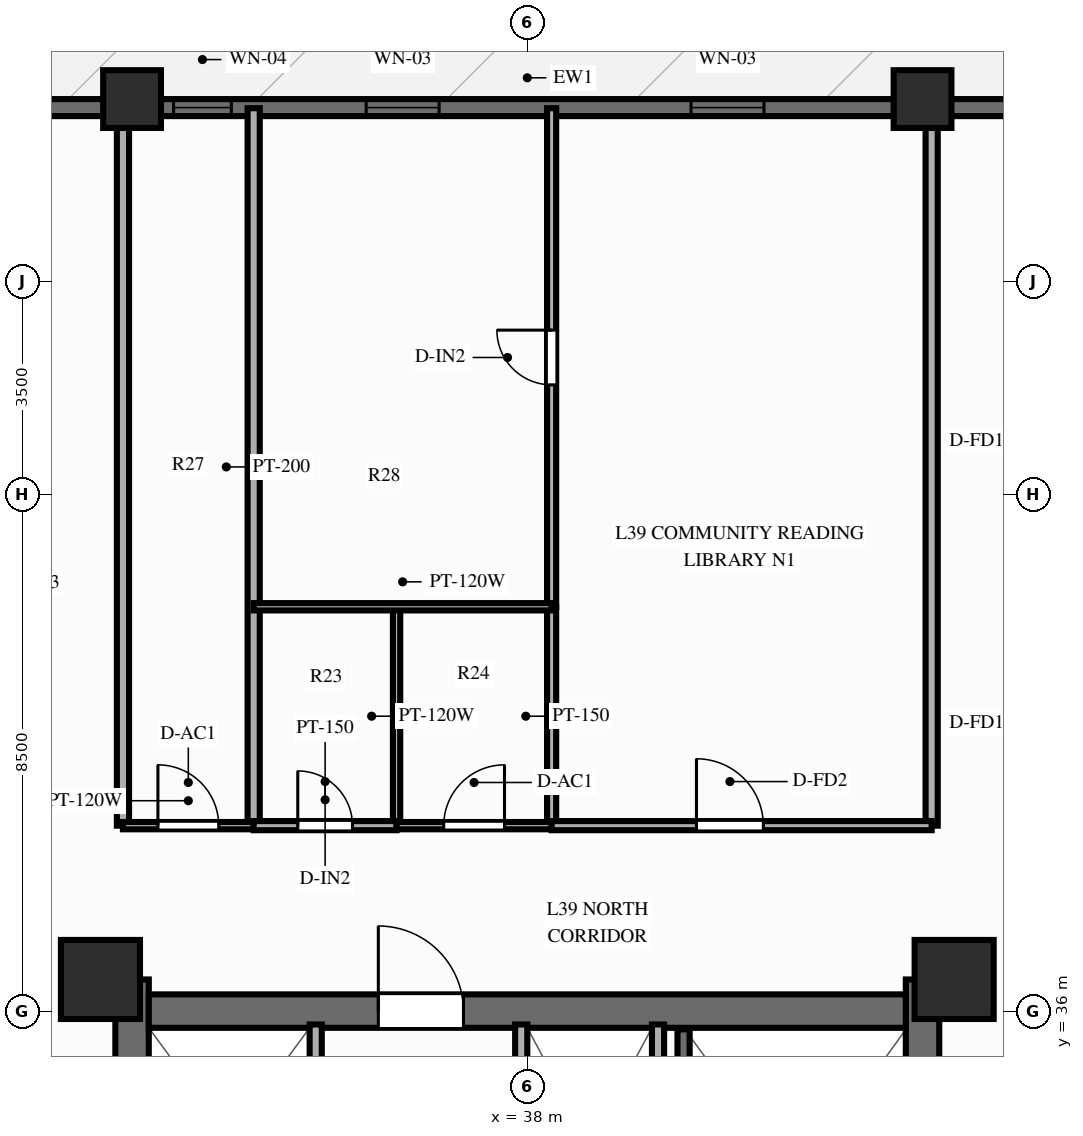
"""IFC4 building model, lengths in metres.
Left out: names, types, materials, properties, quantities, classifications, styles, units other than length and angle.
Written with IfcOpenShell. Run it as: python <this file> out.ifc"""

import sys

from ifc_helpers import new_model, si_unit, direction, frame, frame_2d, origin, origin_2d, place, context, subcontext, project, spatial, rectangle, extrude, source, transform, mapped, element, fill, save


model = new_model("IFC4")
c1 = context("Model", 3, precision=1e-05, world=origin(), true_north=direction((0.0, 1.0)))
c2 = subcontext(c1, "Body", "Model", "MODEL_VIEW")
j1 = project(units=[si_unit("LENGTHUNIT", "METRE"), si_unit("PLANEANGLEUNIT", "RADIAN")], contexts=[c1])
p1 = place(None, origin())
s1 = spatial("IfcSite", under=j1, at=p1, CompositionType="ELEMENT")
p2 = place(p1, origin())
s2 = spatial("IfcBuilding", under=s1, at=p2, CompositionType="ELEMENT")
p3 = place(p2, frame((0.0, 0.0, 122.85)))
s3 = spatial("IfcBuildingStorey", under=s2, at=p3, CompositionType="ELEMENT", Elevation=122.85)
p4 = place(p3, frame((31.5, 17.48, 0.0), z_axis=(0.0, 0.0, 1.0), x_axis=(0.0, 1.0, 0.0)))
e1 = element("IfcWall", 1, at=p4, inside=s3, PredefinedType="SHEAR", context=c2, shape_type="SweptSolid", body=[
    extrude(rectangle(XDim=19.04, YDim=0.55, at=frame_2d((9.52, 0.0))), origin(), (0.0, 0.0, 1.0), 3.9),
])
p5 = place(p4, frame((6.32, 0.0, 0.0)))
e2 = element("IfcOpeningElement", 2, at=p5, cuts=e1, PredefinedType="OPENING", context=c2, shape_type="SweptSolid", body=[
    extrude(rectangle(XDim=1.1, YDim=2.15, at=frame_2d((0.55, 1.075))), frame((0.0, 0.287, 0.0), z_axis=(0.0, -1.0, 0.0), x_axis=(1.0, 0.0, 0.0)), (0.0, 0.0, 1.0), 0.574),
])
p6 = place(p3, frame((44.5, 17.48, 0.0), z_axis=(0.0, 0.0, 1.0), x_axis=(0.0, 1.0, 0.0)))
e3 = element("IfcWall", 3, at=p6, inside=s3, PredefinedType="SHEAR", context=c2, shape_type="SweptSolid", body=[
    extrude(rectangle(XDim=19.04, YDim=0.55, at=frame_2d((9.52, 0.0))), origin(), (0.0, 0.0, 1.0), 3.9),
])
p7 = place(p6, frame((12.67, 0.0, 0.0), z_axis=(0.0, 0.0, 1.0), x_axis=(-1.0, 0.0, 0.0)))
e4 = element("IfcOpeningElement", 4, at=p7, cuts=e3, PredefinedType="OPENING", context=c2, shape_type="SweptSolid", body=[
    extrude(rectangle(XDim=1.1, YDim=2.15, at=frame_2d((0.55, 1.075))), frame((0.0, 0.287, 0.0), z_axis=(0.0, -1.0, 0.0), x_axis=(1.0, 0.0, 0.0)), (0.0, 0.0, 1.0), 0.574),
])
p8 = place(p3, frame((31.775, 36.0, 0.0), z_axis=(0.0, 0.0, 1.0), x_axis=(1.0, 0.0, 0.0)))
e5 = element("IfcWall", 5, at=p8, inside=s3, PredefinedType="SHEAR", context=c2, shape_type="SweptSolid", body=[
    extrude(rectangle(XDim=12.45, YDim=0.55, at=frame_2d((6.225, 0.0))), origin(), (0.0, 0.0, 1.0), 3.9),
])
p9 = place(p8, frame((5.175, 0.0, 0.0), z_axis=(0.0, 0.0, 1.0), x_axis=(-1.0, 0.0, 0.0)))
e6 = element("IfcOpeningElement", 6, at=p9, cuts=e5, PredefinedType="OPENING", context=c2, shape_type="SweptSolid", body=[
    extrude(rectangle(XDim=1.4, YDim=2.15, at=frame_2d((0.7, 1.075))), frame((0.0, 0.287, 0.0), z_axis=(0.0, -1.0, 0.0), x_axis=(1.0, 0.0, 0.0)), (0.0, 0.0, 1.0), 0.574),
])
m1 = source(origin(), c2, "Body", "SweptSolid", [
    extrude(rectangle(XDim=1.3, YDim=1.3, at=origin_2d()), origin(), (0.0, 0.0, 1.0), 3.9),
])
for number, where, z_axis, x_axis in (
    (7, (30.98, 36.52, 0.0), (0.0, 0.0, 1.0), (1.0, 0.0, 0.0)),
    (8, (45.02, 36.52, 0.0), (0.0, 0.0, 1.0), (1.0, 0.0, 0.0)),
):
    element("IfcColumn", number, at=place(p3, frame(where, z_axis=z_axis, x_axis=x_axis)), inside=s3, PredefinedType="COLUMN", context=c2, shape_type="MappedRepresentation", body=[
        mapped(m1, transform((0.0, 0.0, 0.0), scale=1.0)),
    ])
m2 = source(origin(), c2, "Body", "SweptSolid", [
    extrude(rectangle(XDim=0.95, YDim=0.95, at=origin_2d()), origin(), (0.0, 0.0, 1.0), 3.9),
])
for number, where, z_axis, x_axis in (
    (9, (44.5, 51.0, 0.0), (0.0, 0.0, 1.0), (1.0, 0.0, 0.0)),
    (10, (31.5, 51.0, 0.0), (0.0, 0.0, 1.0), (1.0, 0.0, 0.0)),
):
    element("IfcColumn", number, at=place(p3, frame(where, z_axis=z_axis, x_axis=x_axis)), inside=s3, PredefinedType="COLUMN", context=c2, shape_type="MappedRepresentation", body=[
        mapped(m2, transform((0.0, 0.0, 0.0), scale=1.0)),
    ])
p10 = place(p3, frame((16.2, 50.86, 0.0), z_axis=(0.0, 0.0, 1.0), x_axis=(1.0, 0.0, 0.0)))
e11 = element("IfcWall", 11, at=p10, inside=s3, PredefinedType="SOLIDWALL", context=c2, shape_type="SweptSolid", body=[
    extrude(rectangle(XDim=43.6, YDim=0.28, at=frame_2d((21.8, 0.0))), origin(), (0.0, 0.0, 1.0), 2.24),
])
p11 = place(p10, frame((7.1, 0.0, 0.0)))
e12 = element("IfcOpeningElement", 12, at=p11, cuts=e11, PredefinedType="OPENING", context=c2, shape_type="SweptSolid", body=[
    extrude(rectangle(XDim=1.1, YDim=2.15, at=frame_2d((0.55, 1.075))), frame((0.0, 0.152, 0.0), z_axis=(0.0, -1.0, 0.0), x_axis=(1.0, 0.0, 0.0)), (0.0, 0.0, 1.0), 0.304),
])
p12 = place(p10, frame((15.982, 0.0, 0.25)))
e13 = element("IfcOpeningElement", 13, at=p12, cuts=e11, PredefinedType="OPENING", context=c2, shape_type="SweptSolid", body=[
    extrude(rectangle(XDim=0.95, YDim=1.5, at=frame_2d((0.475, 0.75))), frame((0.0, 0.152, 0.0), z_axis=(0.0, -1.0, 0.0), x_axis=(1.0, 0.0, 0.0)), (0.0, 0.0, 1.0), 0.304),
])
p13 = place(p10, frame((19.15, 0.0, 0.25)))
e14 = element("IfcOpeningElement", 14, at=p13, cuts=e11, PredefinedType="OPENING", context=c2, shape_type="SweptSolid", body=[
    extrude(rectangle(XDim=1.2, YDim=1.5, at=frame_2d((0.6, 0.75))), frame((0.0, 0.152, 0.0), z_axis=(0.0, -1.0, 0.0), x_axis=(1.0, 0.0, 0.0)), (0.0, 0.0, 1.0), 0.304),
])
p14 = place(p10, frame((24.492, 0.0, 0.25)))
e15 = element("IfcOpeningElement", 15, at=p14, cuts=e11, PredefinedType="OPENING", context=c2, shape_type="SweptSolid", body=[
    extrude(rectangle(XDim=1.2, YDim=1.5, at=frame_2d((0.6, 0.75))), frame((0.0, 0.152, 0.0), z_axis=(0.0, -1.0, 0.0), x_axis=(1.0, 0.0, 0.0)), (0.0, 0.0, 1.0), 0.304),
])
p15 = place(p10, frame((35.35, 0.0, 0.25)))
e16 = element("IfcOpeningElement", 16, at=p15, cuts=e11, PredefinedType="OPENING", context=c2, shape_type="SweptSolid", body=[
    extrude(rectangle(XDim=1.2, YDim=1.5, at=frame_2d((0.6, 0.75))), frame((0.0, 0.152, 0.0), z_axis=(0.0, -1.0, 0.0), x_axis=(1.0, 0.0, 0.0)), (0.0, 0.0, 1.0), 0.304),
])
p16 = place(p3, frame((40.15, 31.8, 0.0), z_axis=(0.0, 0.0, 1.0), x_axis=(0.0, 1.0, 0.0)))
e17 = element("IfcWall", 17, at=p16, inside=s3, PredefinedType="PARTITIONING", context=c2, shape_type="SweptSolid", body=[
    extrude(rectangle(XDim=3.98, YDim=0.2, at=frame_2d((1.99, 0.0))), origin(), (0.0, 0.0, 1.0), 3.56),
])
p17 = place(p3, frame((40.57, 28.65, 0.0), z_axis=(0.0, 0.0, 1.0), x_axis=(0.0, 1.0, 0.0)))
e18 = element("IfcWall", 18, at=p17, inside=s3, PredefinedType="SOLIDWALL", context=c2, shape_type="SweptSolid", body=[
    extrude(rectangle(XDim=7.05, YDim=0.2, at=frame_2d((3.525, 0.0))), origin(), (0.0, 0.0, 1.0), 3.69),
])
p18 = place(p3, frame((34.52, 25.44, 0.0), z_axis=(0.0, 0.0, 1.0), x_axis=(0.0, 1.0, 0.0)))
e19 = element("IfcWall", 19, at=p18, inside=s3, PredefinedType="PARTITIONING", context=c2, shape_type="SweptSolid", body=[
    extrude(rectangle(XDim=10.34, YDim=0.2, at=frame_2d((5.17, 0.0))), origin(), (0.0, 0.0, 1.0), 3.56),
])
p19 = place(p18, frame((1.15, 0.0, 0.0)))
e20 = element("IfcOpeningElement", 20, at=p19, cuts=e19, PredefinedType="OPENING", context=c2, shape_type="SweptSolid", body=[
    extrude(rectangle(XDim=0.9, YDim=2.1, at=frame_2d((0.45, 1.05))), frame((0.0, 0.112, 0.0), z_axis=(0.0, -1.0, 0.0), x_axis=(1.0, 0.0, 0.0)), (0.0, 0.0, 1.0), 0.224),
])
p20 = place(p18, frame((4.35, 0.0, 0.0)))
e21 = element("IfcOpeningElement", 21, at=p20, cuts=e19, PredefinedType="OPENING", context=c2, shape_type="SweptSolid", body=[
    extrude(rectangle(XDim=0.9, YDim=2.1, at=frame_2d((0.45, 1.05))), frame((0.0, 0.112, 0.0), z_axis=(0.0, -1.0, 0.0), x_axis=(1.0, 0.0, 0.0)), (0.0, 0.0, 1.0), 0.224),
])
p21 = place(p3, frame((37.9, 25.44, 0.0), z_axis=(0.0, 0.0, 1.0), x_axis=(0.0, 1.0, 0.0)))
e22 = element("IfcWall", 22, at=p21, inside=s3, PredefinedType="PARTITIONING", context=c2, shape_type="SweptSolid", body=[
    extrude(rectangle(XDim=10.34, YDim=0.2, at=frame_2d((5.17, 0.0))), origin(), (0.0, 0.0, 1.0), 3.56),
])
p22 = place(p21, frame((0.32, 0.0, 0.0)))
e23 = element("IfcOpeningElement", 23, at=p22, cuts=e22, PredefinedType="OPENING", context=c2, shape_type="SweptSolid", body=[
    extrude(rectangle(XDim=1.0, YDim=2.15, at=frame_2d((0.5, 1.075))), frame((0.0, 0.112, 0.0), z_axis=(0.0, -1.0, 0.0), x_axis=(1.0, 0.0, 0.0)), (0.0, 0.0, 1.0), 0.224),
])
p23 = place(p21, frame((1.71, 0.0, 0.0)))
e24 = element("IfcOpeningElement", 24, at=p23, cuts=e22, PredefinedType="OPENING", context=c2, shape_type="SweptSolid", body=[
    extrude(rectangle(XDim=1.0, YDim=2.15, at=frame_2d((0.5, 1.075))), frame((0.0, 0.112, 0.0), z_axis=(0.0, -1.0, 0.0), x_axis=(1.0, 0.0, 0.0)), (0.0, 0.0, 1.0), 0.224),
])
p24 = place(p21, frame((3.51, 0.0, 0.0)))
e25 = element("IfcOpeningElement", 25, at=p24, cuts=e22, PredefinedType="OPENING", context=c2, shape_type="SweptSolid", body=[
    extrude(rectangle(XDim=1.0, YDim=2.15, at=frame_2d((0.5, 1.075))), frame((0.0, 0.112, 0.0), z_axis=(0.0, -1.0, 0.0), x_axis=(1.0, 0.0, 0.0)), (0.0, 0.0, 1.0), 0.224),
])
p25 = place(p21, frame((5.01, 0.0, 0.0)))
e26 = element("IfcOpeningElement", 26, at=p25, cuts=e22, PredefinedType="OPENING", context=c2, shape_type="SweptSolid", body=[
    extrude(rectangle(XDim=1.0, YDim=2.15, at=frame_2d((0.5, 1.075))), frame((0.0, 0.112, 0.0), z_axis=(0.0, -1.0, 0.0), x_axis=(1.0, 0.0, 0.0)), (0.0, 0.0, 1.0), 0.224),
])
for number, where, z_axis, x_axis in (
    (27, (31.35, 39.05, 0.0), (0.0, 0.0, 1.0), (0.0, 1.0, 0.0)),
    (28, (44.65, 39.05, 0.0), (0.0, 0.0, 1.0), (0.0, 1.0, 0.0)),
):
    element("IfcWall", number, at=place(p3, frame(where, z_axis=z_axis, x_axis=x_axis)), inside=s3, PredefinedType="PARTITIONING", context=c2, shape_type="SweptSolid", body=[
        extrude(rectangle(XDim=11.8, YDim=0.2, at=frame_2d((5.9, 0.0))), origin(), (0.0, 0.0, 1.0), 2.24),
    ])
p26 = place(p3, frame((33.5, 39.05, 0.0), z_axis=(0.0, 0.0, 1.0), x_axis=(0.0, 1.0, 0.0)))
e29 = element("IfcWall", 29, at=p26, inside=s3, PredefinedType="PARTITIONING", context=c2, shape_type="SweptSolid", body=[
    extrude(rectangle(XDim=11.8, YDim=0.2, at=frame_2d((5.9, 0.0))), origin(), (0.0, 0.0, 1.0), 3.56),
])
p27 = place(p3, frame((31.35, 39.05, 0.0), z_axis=(0.0, 0.0, 1.0), x_axis=(1.0, 0.0, 0.0)))
e30 = element("IfcWall", 30, at=p27, inside=s3, PredefinedType="PARTITIONING", context=c2, shape_type="SweptSolid", body=[
    extrude(rectangle(XDim=2.15, YDim=0.12, at=frame_2d((1.075, 0.0))), origin(), (0.0, 0.0, 1.0), 3.56),
])
p28 = place(p27, frame((0.575, 0.0, 0.0)))
e31 = element("IfcOpeningElement", 31, at=p28, cuts=e30, PredefinedType="OPENING", context=c2, shape_type="SweptSolid", body=[
    extrude(rectangle(XDim=1.0, YDim=2.1, at=frame_2d((0.5, 1.05))), frame((0.0, 0.072, 0.0), z_axis=(0.0, -1.0, 0.0), x_axis=(1.0, 0.0, 0.0)), (0.0, 0.0, 1.0), 0.144),
])
p29 = place(p3, frame((35.85, 39.05, 0.0), z_axis=(0.0, 0.0, 1.0), x_axis=(0.0, 1.0, 0.0)))
e32 = element("IfcWall", 32, at=p29, inside=s3, PredefinedType="PARTITIONING", context=c2, shape_type="SweptSolid", body=[
    extrude(rectangle(XDim=3.6, YDim=0.12, at=frame_2d((1.8, 0.0))), origin(), (0.0, 0.0, 1.0), 3.56),
])
p30 = place(p3, frame((38.4, 39.05, 0.0), z_axis=(0.0, 0.0, 1.0), x_axis=(0.0, 1.0, 0.0)))
e33 = element("IfcWall", 33, at=p30, inside=s3, PredefinedType="PARTITIONING", context=c2, shape_type="SweptSolid", body=[
    extrude(rectangle(XDim=3.6, YDim=0.15, at=frame_2d((1.8, 0.0))), origin(), (0.0, 0.0, 1.0), 3.56),
])
p31 = place(p3, frame((38.4, 42.65, 0.0), z_axis=(0.0, 0.0, 1.0), x_axis=(0.0, 1.0, 0.0)))
e34 = element("IfcWall", 34, at=p31, inside=s3, PredefinedType="PARTITIONING", context=c2, shape_type="SweptSolid", body=[
    extrude(rectangle(XDim=8.2, YDim=0.15, at=frame_2d((4.1, 0.0))), origin(), (0.0, 0.0, 1.0), 3.56),
])
p32 = place(p31, frame((3.65, 0.0, 0.0)))
e35 = element("IfcOpeningElement", 35, at=p32, cuts=e34, PredefinedType="OPENING", context=c2, shape_type="SweptSolid", body=[
    extrude(rectangle(XDim=0.9, YDim=2.1, at=frame_2d((0.45, 1.05))), frame((0.0, 0.087, 0.0), z_axis=(0.0, -1.0, 0.0), x_axis=(1.0, 0.0, 0.0)), (0.0, 0.0, 1.0), 0.174),
])
p33 = place(p3, frame((33.5, 42.65, 0.0), z_axis=(0.0, 0.0, 1.0), x_axis=(1.0, 0.0, 0.0)))
e36 = element("IfcWall", 36, at=p33, inside=s3, PredefinedType="PARTITIONING", context=c2, shape_type="SweptSolid", body=[
    extrude(rectangle(XDim=4.9, YDim=0.12, at=frame_2d((2.45, 0.0))), origin(), (0.0, 0.0, 1.0), 3.56),
])
p34 = place(p3, frame((33.5, 39.05, 0.0), z_axis=(0.0, 0.0, 1.0), x_axis=(1.0, 0.0, 0.0)))
e37 = element("IfcWall", 37, at=p34, inside=s3, PredefinedType="PARTITIONING", context=c2, shape_type="SweptSolid", body=[
    extrude(rectangle(XDim=2.35, YDim=0.15, at=frame_2d((1.175, 0.0))), origin(), (0.0, 0.0, 1.0), 3.56),
])
p35 = place(p34, frame((0.725, 0.0, 0.0)))
e38 = element("IfcOpeningElement", 38, at=p35, cuts=e37, PredefinedType="OPENING", context=c2, shape_type="SweptSolid", body=[
    extrude(rectangle(XDim=0.9, YDim=2.1, at=frame_2d((0.45, 1.05))), frame((0.0, 0.087, 0.0), z_axis=(0.0, -1.0, 0.0), x_axis=(1.0, 0.0, 0.0)), (0.0, 0.0, 1.0), 0.174),
])
p36 = place(p3, frame((35.85, 39.05, 0.0), z_axis=(0.0, 0.0, 1.0), x_axis=(1.0, 0.0, 0.0)))
e39 = element("IfcWall", 39, at=p36, inside=s3, PredefinedType="PARTITIONING", context=c2, shape_type="SweptSolid", body=[
    extrude(rectangle(XDim=2.55, YDim=0.12, at=frame_2d((1.275, 0.0))), origin(), (0.0, 0.0, 1.0), 3.56),
])
p37 = place(p36, frame((0.775, 0.0, 0.0)))
e40 = element("IfcOpeningElement", 40, at=p37, cuts=e39, PredefinedType="OPENING", context=c2, shape_type="SweptSolid", body=[
    extrude(rectangle(XDim=1.0, YDim=2.1, at=frame_2d((0.5, 1.05))), frame((0.0, 0.072, 0.0), z_axis=(0.0, -1.0, 0.0), x_axis=(1.0, 0.0, 0.0)), (0.0, 0.0, 1.0), 0.144),
])
p38 = place(p3, frame((38.4, 39.05, 0.0), z_axis=(0.0, 0.0, 1.0), x_axis=(1.0, 0.0, 0.0)))
e41 = element("IfcWall", 41, at=p38, inside=s3, PredefinedType="PARTITIONING", context=c2, shape_type="SweptSolid", body=[
    extrude(rectangle(XDim=6.25, YDim=0.15, at=frame_2d((3.125, 0.0))), origin(), (0.0, 0.0, 1.0), 3.56),
])
p39 = place(p38, frame((2.382, 0.0, 0.0)))
e42 = element("IfcOpeningElement", 42, at=p39, cuts=e41, PredefinedType="OPENING", context=c2, shape_type="SweptSolid", body=[
    extrude(rectangle(XDim=1.1, YDim=2.15, at=frame_2d((0.55, 1.075))), frame((0.0, 0.087, 0.0), z_axis=(0.0, -1.0, 0.0), x_axis=(1.0, 0.0, 0.0)), (0.0, 0.0, 1.0), 0.174),
])
m3 = source(origin(), c2, "Body", "SweptSolid", [
    extrude(rectangle(XDim=0.95, YDim=1.5, at=frame_2d((0.475, 0.75))), frame((0.0, 0.03, 0.0), z_axis=(0.0, -1.0, 0.0), x_axis=(1.0, 0.0, 0.0)), (0.0, 0.0, 1.0), 0.06),
])
p40 = place(p12, origin())
e43 = element("IfcWindow", 43, at=p40, inside=s3, PartitioningType="SINGLE_PANEL", PredefinedType="WINDOW", context=c2, shape_type="MappedRepresentation", body=[
    mapped(m3, transform((0.0, 0.0, 0.0), scale=1.0)),
])
fill(e13, e43)
m4 = source(origin(), c2, "Body", "SweptSolid", [
    extrude(rectangle(XDim=1.2, YDim=1.5, at=frame_2d((0.6, 0.75))), frame((0.0, 0.03, 0.0), z_axis=(0.0, -1.0, 0.0), x_axis=(1.0, 0.0, 0.0)), (0.0, 0.0, 1.0), 0.06),
])
p41 = place(p13, origin())
e44 = element("IfcWindow", 44, at=p41, inside=s3, PartitioningType="SINGLE_PANEL", PredefinedType="WINDOW", context=c2, shape_type="MappedRepresentation", body=[
    mapped(m4, transform((0.0, 0.0, 0.0), scale=1.0)),
])
fill(e14, e44)
p42 = place(p14, origin())
e45 = element("IfcWindow", 45, at=p42, inside=s3, PartitioningType="SINGLE_PANEL", PredefinedType="WINDOW", context=c2, shape_type="MappedRepresentation", body=[
    mapped(m4, transform((0.0, 0.0, 0.0), scale=1.0)),
])
fill(e15, e45)
m5 = source(origin(), c2, "Body", "SweptSolid", [
    extrude(rectangle(XDim=1.4, YDim=2.15, at=frame_2d((0.7, 1.075))), frame((0.0, 0.025, 0.0), z_axis=(0.0, -1.0, 0.0), x_axis=(1.0, 0.0, 0.0)), (0.0, 0.0, 1.0), 0.05),
])
p43 = place(p9, origin())
e46 = element("IfcDoor", 46, at=p43, inside=s3, OperationType="SINGLE_SWING_RIGHT", PredefinedType="DOOR", context=c2, shape_type="MappedRepresentation", body=[
    mapped(m5, transform((0.0, 0.0, 0.0), scale=1.0)),
])
fill(e6, e46)
m6 = source(origin(), c2, "Body", "SweptSolid", [
    extrude(rectangle(XDim=1.0, YDim=2.1, at=frame_2d((0.5, 1.05))), frame((0.0, 0.025, 0.0), z_axis=(0.0, -1.0, 0.0), x_axis=(1.0, 0.0, 0.0)), (0.0, 0.0, 1.0), 0.05),
])
p44 = place(p28, origin())
e47 = element("IfcDoor", 47, at=p44, inside=s3, OperationType="SINGLE_SWING_LEFT", PredefinedType="DOOR", context=c2, shape_type="MappedRepresentation", body=[
    mapped(m6, transform((0.0, 0.0, 0.0), scale=1.0)),
])
fill(e31, e47)
m7 = source(origin(), c2, "Body", "SweptSolid", [
    extrude(rectangle(XDim=0.9, YDim=2.1, at=frame_2d((0.45, 1.05))), frame((0.0, 0.025, 0.0), z_axis=(0.0, -1.0, 0.0), x_axis=(1.0, 0.0, 0.0)), (0.0, 0.0, 1.0), 0.05),
])
p45 = place(p32, origin())
e48 = element("IfcDoor", 48, at=p45, inside=s3, OperationType="SINGLE_SWING_RIGHT", PredefinedType="DOOR", context=c2, shape_type="MappedRepresentation", body=[
    mapped(m7, transform((0.0, 0.0, 0.0), scale=1.0)),
])
fill(e35, e48)
p46 = place(p35, origin())
e49 = element("IfcDoor", 49, at=p46, inside=s3, OperationType="SINGLE_SWING_LEFT", PredefinedType="DOOR", context=c2, shape_type="MappedRepresentation", body=[
    mapped(m7, transform((0.0, 0.0, 0.0), scale=1.0)),
])
fill(e38, e49)
p47 = place(p37, origin())
e50 = element("IfcDoor", 50, at=p47, inside=s3, OperationType="SINGLE_SWING_RIGHT", PredefinedType="DOOR", context=c2, shape_type="MappedRepresentation", body=[
    mapped(m6, transform((0.0, 0.0, 0.0), scale=1.0)),
])
fill(e40, e50)
m8 = source(origin(), c2, "Body", "SweptSolid", [
    extrude(rectangle(XDim=1.1, YDim=2.15, at=frame_2d((0.55, 1.075))), frame((0.0, 0.025, 0.0), z_axis=(0.0, -1.0, 0.0), x_axis=(1.0, 0.0, 0.0)), (0.0, 0.0, 1.0), 0.05),
])
p48 = place(p39, origin())
e51 = element("IfcDoor", 51, at=p48, inside=s3, OperationType="SINGLE_SWING_LEFT", PredefinedType="DOOR", context=c2, shape_type="MappedRepresentation", body=[
    mapped(m8, transform((0.0, 0.0, 0.0), scale=1.0)),
])
fill(e42, e51)
save(model, sys.argv[1])
